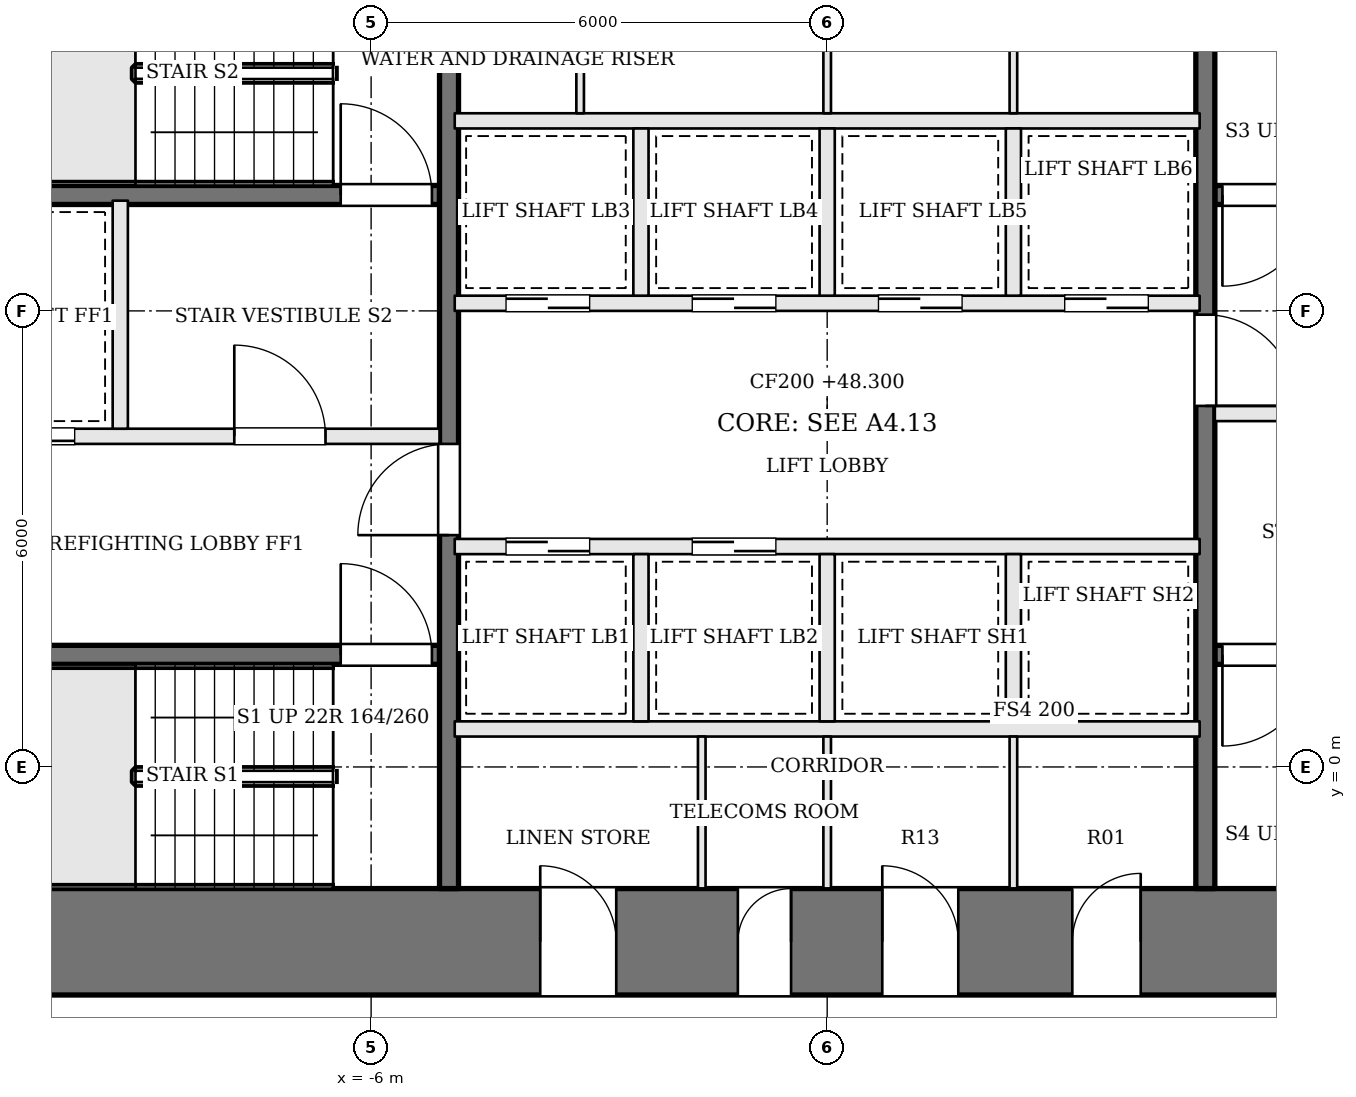
"""IFC4 building model, lengths in metres.
Left out: names, types, materials, properties, quantities, classifications, styles, units other than length and angle.
Written with IfcOpenShell. Run it as: python <this file> out.ifc"""

import sys

from ifc_helpers import new_model, si_unit, direction, frame, frame_2d, origin, place, context, subcontext, project, spatial, rectangle, extrude, element, fill, save


model = new_model("IFC4")
c1 = context("Model", 3, precision=1e-05, world=origin(), true_north=direction((0.0, 1.0)))
c2 = subcontext(c1, "Body", "Model", "MODEL_VIEW")
j1 = project(units=[si_unit("LENGTHUNIT", "METRE"), si_unit("PLANEANGLEUNIT", "RADIAN")], contexts=[c1])
p1 = place(None, origin())
s1 = spatial("IfcSite", under=j1, at=p1, CompositionType="ELEMENT")
p2 = place(p1, origin())
s2 = spatial("IfcBuilding", under=s1, at=p2, CompositionType="ELEMENT")
p3 = place(p2, frame((0.0, 0.0, 48.3)))
s3 = spatial("IfcBuildingStorey", under=s2, at=p3, CompositionType="ELEMENT", Elevation=48.3)
p4 = place(p3, frame((-13.0, -2.3, 0.0), z_axis=(0.0, 0.0, 1.0), x_axis=(1.0, 0.0, 0.0)))
e1 = element("IfcWall", 1, at=p4, inside=s3, PredefinedType="SHEAR", context=c2, shape_type="SweptSolid", body=[
    extrude(rectangle(XDim=26.0, YDim=1.4, at=frame_2d((13.0, 0.0))), origin(), (0.0, 0.0, 1.0), 3.6),
])
p5 = place(p4, frame((9.225, 0.0, 0.0)))
e2 = element("IfcOpeningElement", 2, at=p5, cuts=e1, PredefinedType="OPENING", context=c2, shape_type="SweptSolid", body=[
    extrude(rectangle(XDim=1.0, YDim=2.1, at=frame_2d((0.5, 1.05))), frame((0.0, 0.71, 0.0), z_axis=(0.0, -1.0, 0.0), x_axis=(1.0, 0.0, 0.0)), (0.0, 0.0, 1.0), 1.42),
])
p6 = place(p4, frame((11.825, 0.0, 0.0)))
e3 = element("IfcOpeningElement", 3, at=p6, cuts=e1, PredefinedType="OPENING", context=c2, shape_type="SweptSolid", body=[
    extrude(rectangle(XDim=0.7, YDim=2.1, at=frame_2d((0.35, 1.05))), frame((0.0, 0.71, 0.0), z_axis=(0.0, -1.0, 0.0), x_axis=(1.0, 0.0, 0.0)), (0.0, 0.0, 1.0), 1.42),
])
p7 = place(p4, frame((13.725, 0.0, 0.0)))
e4 = element("IfcOpeningElement", 4, at=p7, cuts=e1, PredefinedType="OPENING", context=c2, shape_type="SweptSolid", body=[
    extrude(rectangle(XDim=1.0, YDim=2.1, at=frame_2d((0.5, 1.05))), frame((0.0, 0.71, 0.0), z_axis=(0.0, -1.0, 0.0), x_axis=(1.0, 0.0, 0.0)), (0.0, 0.0, 1.0), 1.42),
])
p8 = place(p4, frame((16.225, 0.0, 0.0)))
e5 = element("IfcOpeningElement", 5, at=p8, cuts=e1, PredefinedType="OPENING", context=c2, shape_type="SweptSolid", body=[
    extrude(rectangle(XDim=0.9, YDim=2.1, at=frame_2d((0.45, 1.05))), frame((0.0, 0.71, 0.0), z_axis=(0.0, -1.0, 0.0), x_axis=(1.0, 0.0, 0.0)), (0.0, 0.0, 1.0), 1.42),
])
p9 = place(p3, frame((-11.6, 1.475, 0.0), z_axis=(0.0, 0.0, 1.0), x_axis=(1.0, 0.0, 0.0)))
e6 = element("IfcWall", 6, at=p9, inside=s3, PredefinedType="SOLIDWALL", context=c2, shape_type="SweptSolid", body=[
    extrude(rectangle(XDim=6.5, YDim=0.25, at=frame_2d((3.25, 0.0))), origin(), (0.0, 0.0, 1.0), 3.4),
])
p10 = place(p9, frame((5.2, 0.0, 0.0)))
e7 = element("IfcOpeningElement", 7, at=p10, cuts=e6, PredefinedType="OPENING", context=c2, shape_type="SweptSolid", body=[
    extrude(rectangle(XDim=1.2, YDim=2.1, at=frame_2d((0.6, 1.05))), frame((0.0, 0.135, 0.0), z_axis=(0.0, -1.0, 0.0), x_axis=(1.0, 0.0, 0.0)), (0.0, 0.0, 1.0), 0.27),
])
p11 = place(p3, frame((11.6, 7.525, 0.0), z_axis=(0.0, 0.0, 1.0), x_axis=(-1.0, 0.0, 0.0)))
e8 = element("IfcWall", 8, at=p11, inside=s3, PredefinedType="SOLIDWALL", context=c2, shape_type="SweptSolid", body=[
    extrude(rectangle(XDim=6.5, YDim=0.25, at=frame_2d((3.25, 0.0))), origin(), (0.0, 0.0, 1.0), 3.4),
])
p12 = place(p11, frame((5.2, 0.0, 0.0)))
e9 = element("IfcOpeningElement", 9, at=p12, cuts=e8, PredefinedType="OPENING", context=c2, shape_type="SweptSolid", body=[
    extrude(rectangle(XDim=1.2, YDim=2.1, at=frame_2d((0.6, 1.05))), frame((0.0, 0.135, 0.0), z_axis=(0.0, -1.0, 0.0), x_axis=(1.0, 0.0, 0.0)), (0.0, 0.0, 1.0), 0.27),
])
p13 = place(p3, frame((-11.6, 4.35, 0.0), z_axis=(0.0, 0.0, 1.0), x_axis=(1.0, 0.0, 0.0)))
e10 = element("IfcWall", 10, at=p13, inside=s3, PredefinedType="SOLIDWALL", context=c2, shape_type="SweptSolid", body=[
    extrude(rectangle(XDim=6.5, YDim=0.2, at=frame_2d((3.25, 0.0))), origin(), (0.0, 0.0, 1.0), 3.4),
])
p14 = place(p13, frame((3.8, 0.0, 0.0)))
e11 = element("IfcOpeningElement", 11, at=p14, cuts=e10, PredefinedType="OPENING", context=c2, shape_type="SweptSolid", body=[
    extrude(rectangle(XDim=1.2, YDim=2.1, at=frame_2d((0.6, 1.05))), frame((0.0, 0.11, 0.0), z_axis=(0.0, -1.0, 0.0), x_axis=(1.0, 0.0, 0.0)), (0.0, 0.0, 1.0), 0.22),
])
p15 = place(p13, frame((0.5, 0.0, 0.0)))
e12 = element("IfcOpeningElement", 12, at=p15, cuts=e10, PredefinedType="OPENING", context=c2, shape_type="SweptSolid", body=[
    extrude(rectangle(XDim=1.2, YDim=2.1, at=frame_2d((0.6, 1.05))), frame((0.0, 0.11, 0.0), z_axis=(0.0, -1.0, 0.0), x_axis=(1.0, 0.0, 0.0)), (0.0, 0.0, 1.0), 0.22),
])
p16 = place(p3, frame((11.6, 4.65, 0.0), z_axis=(0.0, 0.0, 1.0), x_axis=(-1.0, 0.0, 0.0)))
e13 = element("IfcWall", 13, at=p16, inside=s3, PredefinedType="SOLIDWALL", context=c2, shape_type="SweptSolid", body=[
    extrude(rectangle(XDim=6.5, YDim=0.2, at=frame_2d((3.25, 0.0))), origin(), (0.0, 0.0, 1.0), 3.4),
])
p17 = place(p16, frame((3.8, 0.0, 0.0)))
e14 = element("IfcOpeningElement", 14, at=p17, cuts=e13, PredefinedType="OPENING", context=c2, shape_type="SweptSolid", body=[
    extrude(rectangle(XDim=1.2, YDim=2.1, at=frame_2d((0.6, 1.05))), frame((0.0, 0.11, 0.0), z_axis=(0.0, -1.0, 0.0), x_axis=(1.0, 0.0, 0.0)), (0.0, 0.0, 1.0), 0.22),
])
p18 = place(p16, frame((0.5, 0.0, 0.0)))
e15 = element("IfcOpeningElement", 15, at=p18, cuts=e13, PredefinedType="OPENING", context=c2, shape_type="SweptSolid", body=[
    extrude(rectangle(XDim=1.2, YDim=2.1, at=frame_2d((0.6, 1.05))), frame((0.0, 0.11, 0.0), z_axis=(0.0, -1.0, 0.0), x_axis=(1.0, 0.0, 0.0)), (0.0, 0.0, 1.0), 0.22),
])
p19 = place(p3, frame((-11.6, 7.525, 0.0), z_axis=(0.0, 0.0, 1.0), x_axis=(1.0, 0.0, 0.0)))
e16 = element("IfcWall", 16, at=p19, inside=s3, PredefinedType="SOLIDWALL", context=c2, shape_type="SweptSolid", body=[
    extrude(rectangle(XDim=6.5, YDim=0.25, at=frame_2d((3.25, 0.0))), origin(), (0.0, 0.0, 1.0), 3.4),
])
p20 = place(p19, frame((5.2, 0.0, 0.0)))
e17 = element("IfcOpeningElement", 17, at=p20, cuts=e16, PredefinedType="OPENING", context=c2, shape_type="SweptSolid", body=[
    extrude(rectangle(XDim=1.2, YDim=2.1, at=frame_2d((0.6, 1.05))), frame((0.0, 0.135, 0.0), z_axis=(0.0, -1.0, 0.0), x_axis=(1.0, 0.0, 0.0)), (0.0, 0.0, 1.0), 0.27),
])
p21 = place(p3, frame((11.6, 1.475, 0.0), z_axis=(0.0, 0.0, 1.0), x_axis=(-1.0, 0.0, 0.0)))
e18 = element("IfcWall", 18, at=p21, inside=s3, PredefinedType="SOLIDWALL", context=c2, shape_type="SweptSolid", body=[
    extrude(rectangle(XDim=6.5, YDim=0.25, at=frame_2d((3.25, 0.0))), origin(), (0.0, 0.0, 1.0), 3.4),
])
p22 = place(p21, frame((5.2, 0.0, 0.0)))
e19 = element("IfcOpeningElement", 19, at=p22, cuts=e18, PredefinedType="OPENING", context=c2, shape_type="SweptSolid", body=[
    extrude(rectangle(XDim=1.2, YDim=2.1, at=frame_2d((0.6, 1.05))), frame((0.0, 0.135, 0.0), z_axis=(0.0, -1.0, 0.0), x_axis=(1.0, 0.0, 0.0)), (0.0, 0.0, 1.0), 0.27),
])
p23 = place(p3, frame((-9.3, 4.45, 0.0), z_axis=(0.0, 0.0, 1.0), x_axis=(0.0, 1.0, 0.0)))
e20 = element("IfcWall", 20, at=p23, inside=s3, PredefinedType="SOLIDWALL", context=c2, shape_type="SweptSolid", body=[
    extrude(rectangle(XDim=3.0, YDim=0.2, at=frame_2d((1.5, 0.0))), origin(), (0.0, 0.0, 1.0), 3.4),
])
p24 = place(p3, frame((-4.975, -1.6, 0.0), z_axis=(0.0, 0.0, 1.0), x_axis=(0.0, 1.0, 0.0)))
e21 = element("IfcWall", 21, at=p24, inside=s3, PredefinedType="SOLIDWALL", context=c2, shape_type="SweptSolid", body=[
    extrude(rectangle(XDim=12.2, YDim=0.25, at=frame_2d((6.1, 0.0))), origin(), (0.0, 0.0, 1.0), 3.4),
])
p25 = place(p24, frame((4.65, 0.0, 0.0)))
e22 = element("IfcOpeningElement", 22, at=p25, cuts=e21, PredefinedType="OPENING", context=c2, shape_type="SweptSolid", body=[
    extrude(rectangle(XDim=1.2, YDim=2.1, at=frame_2d((0.6, 1.05))), frame((0.0, 0.135, 0.0), z_axis=(0.0, -1.0, 0.0), x_axis=(1.0, 0.0, 0.0)), (0.0, 0.0, 1.0), 0.27),
])
p26 = place(p3, frame((4.975, 10.6, 0.0), z_axis=(0.0, 0.0, 1.0), x_axis=(0.0, -1.0, 0.0)))
e23 = element("IfcWall", 23, at=p26, inside=s3, PredefinedType="SOLIDWALL", context=c2, shape_type="SweptSolid", body=[
    extrude(rectangle(XDim=12.2, YDim=0.25, at=frame_2d((6.1, 0.0))), origin(), (0.0, 0.0, 1.0), 3.4),
])
p27 = place(p26, frame((4.65, 0.0, 0.0)))
e24 = element("IfcOpeningElement", 24, at=p27, cuts=e23, PredefinedType="OPENING", context=c2, shape_type="SweptSolid", body=[
    extrude(rectangle(XDim=1.2, YDim=2.1, at=frame_2d((0.6, 1.05))), frame((0.0, 0.135, 0.0), z_axis=(0.0, -1.0, 0.0), x_axis=(1.0, 0.0, 0.0)), (0.0, 0.0, 1.0), 0.27),
])
p28 = place(p3, frame((-4.9, 0.5, 0.0), z_axis=(0.0, 0.0, 1.0), x_axis=(1.0, 0.0, 0.0)))
e25 = element("IfcWall", 25, at=p28, inside=s3, PredefinedType="SOLIDWALL", context=c2, shape_type="SweptSolid", body=[
    extrude(rectangle(XDim=9.8, YDim=0.2, at=frame_2d((4.9, 0.0))), origin(), (0.0, 0.0, 1.0), 3.4),
])
p29 = place(p3, frame((-4.9, 2.9, 0.0), z_axis=(0.0, 0.0, 1.0), x_axis=(1.0, 0.0, 0.0)))
e26 = element("IfcWall", 26, at=p29, inside=s3, PredefinedType="SOLIDWALL", context=c2, shape_type="SweptSolid", body=[
    extrude(rectangle(XDim=9.8, YDim=0.2, at=frame_2d((4.9, 0.0))), origin(), (0.0, 0.0, 1.0), 3.4),
])
p30 = place(p29, frame((0.675, 0.0, 0.0)))
e27 = element("IfcOpeningElement", 27, at=p30, cuts=e26, PredefinedType="OPENING", context=c2, shape_type="SweptSolid", body=[
    extrude(rectangle(XDim=1.1, YDim=2.1, at=frame_2d((0.55, 1.05))), frame((0.0, 0.11, 0.0), z_axis=(0.0, -1.0, 0.0), x_axis=(1.0, 0.0, 0.0)), (0.0, 0.0, 1.0), 0.22),
])
p31 = place(p29, frame((3.125, 0.0, 0.0)))
e28 = element("IfcOpeningElement", 28, at=p31, cuts=e26, PredefinedType="OPENING", context=c2, shape_type="SweptSolid", body=[
    extrude(rectangle(XDim=1.1, YDim=2.1, at=frame_2d((0.55, 1.05))), frame((0.0, 0.11, 0.0), z_axis=(0.0, -1.0, 0.0), x_axis=(1.0, 0.0, 0.0)), (0.0, 0.0, 1.0), 0.22),
])
p32 = place(p3, frame((-4.9, 6.1, 0.0), z_axis=(0.0, 0.0, 1.0), x_axis=(1.0, 0.0, 0.0)))
e29 = element("IfcWall", 29, at=p32, inside=s3, PredefinedType="SOLIDWALL", context=c2, shape_type="SweptSolid", body=[
    extrude(rectangle(XDim=9.8, YDim=0.2, at=frame_2d((4.9, 0.0))), origin(), (0.0, 0.0, 1.0), 3.4),
])
p33 = place(p32, frame((0.675, 0.0, 0.0)))
e30 = element("IfcOpeningElement", 30, at=p33, cuts=e29, PredefinedType="OPENING", context=c2, shape_type="SweptSolid", body=[
    extrude(rectangle(XDim=1.1, YDim=2.1, at=frame_2d((0.55, 1.05))), frame((0.0, 0.11, 0.0), z_axis=(0.0, -1.0, 0.0), x_axis=(1.0, 0.0, 0.0)), (0.0, 0.0, 1.0), 0.22),
])
p34 = place(p32, frame((3.125, 0.0, 0.0)))
e31 = element("IfcOpeningElement", 31, at=p34, cuts=e29, PredefinedType="OPENING", context=c2, shape_type="SweptSolid", body=[
    extrude(rectangle(XDim=1.1, YDim=2.1, at=frame_2d((0.55, 1.05))), frame((0.0, 0.11, 0.0), z_axis=(0.0, -1.0, 0.0), x_axis=(1.0, 0.0, 0.0)), (0.0, 0.0, 1.0), 0.22),
])
p35 = place(p32, frame((5.575, 0.0, 0.0)))
e32 = element("IfcOpeningElement", 32, at=p35, cuts=e29, PredefinedType="OPENING", context=c2, shape_type="SweptSolid", body=[
    extrude(rectangle(XDim=1.1, YDim=2.1, at=frame_2d((0.55, 1.05))), frame((0.0, 0.11, 0.0), z_axis=(0.0, -1.0, 0.0), x_axis=(1.0, 0.0, 0.0)), (0.0, 0.0, 1.0), 0.22),
])
p36 = place(p32, frame((8.025, 0.0, 0.0)))
e33 = element("IfcOpeningElement", 33, at=p36, cuts=e29, PredefinedType="OPENING", context=c2, shape_type="SweptSolid", body=[
    extrude(rectangle(XDim=1.1, YDim=2.1, at=frame_2d((0.55, 1.05))), frame((0.0, 0.11, 0.0), z_axis=(0.0, -1.0, 0.0), x_axis=(1.0, 0.0, 0.0)), (0.0, 0.0, 1.0), 0.22),
])
p37 = place(p3, frame((-4.9, 8.5, 0.0), z_axis=(0.0, 0.0, 1.0), x_axis=(1.0, 0.0, 0.0)))
e34 = element("IfcWall", 34, at=p37, inside=s3, PredefinedType="SOLIDWALL", context=c2, shape_type="SweptSolid", body=[
    extrude(rectangle(XDim=9.8, YDim=0.2, at=frame_2d((4.9, 0.0))), origin(), (0.0, 0.0, 1.0), 3.4),
])
for number, where, z_axis, x_axis in (
    (35, (-2.45, 0.6, 0.0), (0.0, 0.0, 1.0), (0.0, 1.0, 0.0)),
    (36, (0.0, 0.6, 0.0), (0.0, 0.0, 1.0), (0.0, 1.0, 0.0)),
    (37, (2.45, 0.6, 0.0), (0.0, 0.0, 1.0), (0.0, 1.0, 0.0)),
    (38, (-2.45, 6.2, 0.0), (0.0, 0.0, 1.0), (0.0, 1.0, 0.0)),
    (39, (0.0, 6.2, 0.0), (0.0, 0.0, 1.0), (0.0, 1.0, 0.0)),
    (40, (2.45, 6.2, 0.0), (0.0, 0.0, 1.0), (0.0, 1.0, 0.0)),
):
    element("IfcWall", number, at=place(p3, frame(where, z_axis=z_axis, x_axis=x_axis)), inside=s3, PredefinedType="SOLIDWALL", context=c2, shape_type="SweptSolid", body=[
        extrude(rectangle(XDim=2.2, YDim=0.2, at=frame_2d((1.1, 0.0))), origin(), (0.0, 0.0, 1.0), 3.4),
    ])
for number, where, z_axis, x_axis in (
    (41, (-1.65, -1.6, 0.0), (0.0, 0.0, 1.0), (0.0, 1.0, 0.0)),
    (42, (0.0, -1.6, 0.0), (0.0, 0.0, 1.0), (0.0, 1.0, 0.0)),
    (43, (2.45, -1.6, 0.0), (0.0, 0.0, 1.0), (0.0, 1.0, 0.0)),
    (44, (-3.25, 8.6, 0.0), (0.0, 0.0, 1.0), (0.0, 1.0, 0.0)),
    (45, (0.0, 8.6, 0.0), (0.0, 0.0, 1.0), (0.0, 1.0, 0.0)),
    (46, (2.45, 8.6, 0.0), (0.0, 0.0, 1.0), (0.0, 1.0, 0.0)),
):
    element("IfcWall", number, at=place(p3, frame(where, z_axis=z_axis, x_axis=x_axis)), inside=s3, PredefinedType="PARTITIONING", context=c2, shape_type="SweptSolid", body=[
        extrude(rectangle(XDim=2.0, YDim=0.1, at=frame_2d((1.0, 0.0))), origin(), (0.0, 0.0, 1.0), 3.4),
    ])
p38 = place(p25, origin())
e47 = element("IfcDoor", 47, at=p38, inside=s3, OperationType="SINGLE_SWING_LEFT", PredefinedType="DOOR", context=c2, shape_type="SweptSolid", body=[
    extrude(rectangle(XDim=1.2, YDim=2.1, at=frame_2d((0.6, 1.05))), frame((0.0, 0.025, 0.0), z_axis=(0.0, -1.0, 0.0), x_axis=(1.0, 0.0, 0.0)), (0.0, 0.0, 1.0), 0.05),
])
fill(e22, e47)
p39 = place(p27, origin())
e48 = element("IfcDoor", 48, at=p39, inside=s3, OperationType="SINGLE_SWING_RIGHT", PredefinedType="DOOR", context=c2, shape_type="SweptSolid", body=[
    extrude(rectangle(XDim=1.2, YDim=2.1, at=frame_2d((0.6, 1.05))), frame((0.0, 0.025, 0.0), z_axis=(0.0, -1.0, 0.0), x_axis=(1.0, 0.0, 0.0)), (0.0, 0.0, 1.0), 0.05),
])
fill(e24, e48)
p40 = place(p14, origin())
e49 = element("IfcDoor", 49, at=p40, inside=s3, OperationType="SINGLE_SWING_LEFT", PredefinedType="DOOR", context=c2, shape_type="SweptSolid", body=[
    extrude(rectangle(XDim=1.2, YDim=2.1, at=frame_2d((0.6, 1.05))), frame((0.0, 0.025, 0.0), z_axis=(0.0, -1.0, 0.0), x_axis=(1.0, 0.0, 0.0)), (0.0, 0.0, 1.0), 0.05),
])
fill(e11, e49)
p41 = place(p10, origin())
e50 = element("IfcDoor", 50, at=p41, inside=s3, OperationType="SINGLE_SWING_LEFT", PredefinedType="DOOR", context=c2, shape_type="SweptSolid", body=[
    extrude(rectangle(XDim=1.2, YDim=2.1, at=frame_2d((0.6, 1.05))), frame((0.0, 0.025, 0.0), z_axis=(0.0, -1.0, 0.0), x_axis=(1.0, 0.0, 0.0)), (0.0, 0.0, 1.0), 0.05),
])
fill(e7, e50)
p42 = place(p12, origin())
e51 = element("IfcDoor", 51, at=p42, inside=s3, OperationType="SINGLE_SWING_RIGHT", PredefinedType="DOOR", context=c2, shape_type="SweptSolid", body=[
    extrude(rectangle(XDim=1.2, YDim=2.1, at=frame_2d((0.6, 1.05))), frame((0.0, 0.025, 0.0), z_axis=(0.0, -1.0, 0.0), x_axis=(1.0, 0.0, 0.0)), (0.0, 0.0, 1.0), 0.05),
])
fill(e9, e51)
p43 = place(p20, origin())
e52 = element("IfcDoor", 52, at=p43, inside=s3, OperationType="SINGLE_SWING_LEFT", PredefinedType="DOOR", context=c2, shape_type="SweptSolid", body=[
    extrude(rectangle(XDim=1.2, YDim=2.1, at=frame_2d((0.6, 1.05))), frame((0.0, 0.025, 0.0), z_axis=(0.0, -1.0, 0.0), x_axis=(1.0, 0.0, 0.0)), (0.0, 0.0, 1.0), 0.05),
])
fill(e17, e52)
p44 = place(p22, origin())
e53 = element("IfcDoor", 53, at=p44, inside=s3, OperationType="SINGLE_SWING_RIGHT", PredefinedType="DOOR", context=c2, shape_type="SweptSolid", body=[
    extrude(rectangle(XDim=1.2, YDim=2.1, at=frame_2d((0.6, 1.05))), frame((0.0, 0.025, 0.0), z_axis=(0.0, -1.0, 0.0), x_axis=(1.0, 0.0, 0.0)), (0.0, 0.0, 1.0), 0.05),
])
fill(e19, e53)
p45 = place(p15, origin())
e54 = element("IfcDoor", 54, at=p45, inside=s3, OperationType="SLIDING_TO_RIGHT", PredefinedType="DOOR", context=c2, shape_type="SweptSolid", body=[
    extrude(rectangle(XDim=1.2, YDim=2.1, at=frame_2d((0.6, 1.05))), frame((0.0, 0.025, 0.0), z_axis=(0.0, -1.0, 0.0), x_axis=(1.0, 0.0, 0.0)), (0.0, 0.0, 1.0), 0.05),
])
fill(e12, e54)
p46 = place(p30, origin())
e55 = element("IfcDoor", 55, at=p46, inside=s3, OperationType="SLIDING_TO_RIGHT", PredefinedType="DOOR", context=c2, shape_type="SweptSolid", body=[
    extrude(rectangle(XDim=1.1, YDim=2.1, at=frame_2d((0.55, 1.05))), frame((0.0, 0.025, 0.0), z_axis=(0.0, -1.0, 0.0), x_axis=(1.0, 0.0, 0.0)), (0.0, 0.0, 1.0), 0.05),
])
fill(e27, e55)
p47 = place(p31, origin())
e56 = element("IfcDoor", 56, at=p47, inside=s3, OperationType="SLIDING_TO_LEFT", PredefinedType="DOOR", context=c2, shape_type="SweptSolid", body=[
    extrude(rectangle(XDim=1.1, YDim=2.1, at=frame_2d((0.55, 1.05))), frame((0.0, 0.025, 0.0), z_axis=(0.0, -1.0, 0.0), x_axis=(1.0, 0.0, 0.0)), (0.0, 0.0, 1.0), 0.05),
])
fill(e28, e56)
p48 = place(p33, origin())
e57 = element("IfcDoor", 57, at=p48, inside=s3, OperationType="SLIDING_TO_RIGHT", PredefinedType="DOOR", context=c2, shape_type="SweptSolid", body=[
    extrude(rectangle(XDim=1.1, YDim=2.1, at=frame_2d((0.55, 1.05))), frame((0.0, 0.025, 0.0), z_axis=(0.0, -1.0, 0.0), x_axis=(1.0, 0.0, 0.0)), (0.0, 0.0, 1.0), 0.05),
])
fill(e30, e57)
p49 = place(p34, origin())
e58 = element("IfcDoor", 58, at=p49, inside=s3, OperationType="SLIDING_TO_LEFT", PredefinedType="DOOR", context=c2, shape_type="SweptSolid", body=[
    extrude(rectangle(XDim=1.1, YDim=2.1, at=frame_2d((0.55, 1.05))), frame((0.0, 0.025, 0.0), z_axis=(0.0, -1.0, 0.0), x_axis=(1.0, 0.0, 0.0)), (0.0, 0.0, 1.0), 0.05),
])
fill(e31, e58)
p50 = place(p35, origin())
e59 = element("IfcDoor", 59, at=p50, inside=s3, OperationType="SLIDING_TO_RIGHT", PredefinedType="DOOR", context=c2, shape_type="SweptSolid", body=[
    extrude(rectangle(XDim=1.1, YDim=2.1, at=frame_2d((0.55, 1.05))), frame((0.0, 0.025, 0.0), z_axis=(0.0, -1.0, 0.0), x_axis=(1.0, 0.0, 0.0)), (0.0, 0.0, 1.0), 0.05),
])
fill(e32, e59)
p51 = place(p36, origin())
e60 = element("IfcDoor", 60, at=p51, inside=s3, OperationType="SLIDING_TO_LEFT", PredefinedType="DOOR", context=c2, shape_type="SweptSolid", body=[
    extrude(rectangle(XDim=1.1, YDim=2.1, at=frame_2d((0.55, 1.05))), frame((0.0, 0.025, 0.0), z_axis=(0.0, -1.0, 0.0), x_axis=(1.0, 0.0, 0.0)), (0.0, 0.0, 1.0), 0.05),
])
fill(e33, e60)
p52 = place(p5, origin())
e61 = element("IfcDoor", 61, at=p52, inside=s3, OperationType="SINGLE_SWING_LEFT", PredefinedType="DOOR", context=c2, shape_type="SweptSolid", body=[
    extrude(rectangle(XDim=1.0, YDim=2.1, at=frame_2d((0.5, 1.05))), frame((0.0, 0.025, 0.0), z_axis=(0.0, -1.0, 0.0), x_axis=(1.0, 0.0, 0.0)), (0.0, 0.0, 1.0), 0.05),
])
fill(e2, e61)
p53 = place(p6, origin())
e62 = element("IfcDoor", 62, at=p53, inside=s3, OperationType="SINGLE_SWING_RIGHT", PredefinedType="DOOR", context=c2, shape_type="SweptSolid", body=[
    extrude(rectangle(XDim=0.7, YDim=2.1, at=frame_2d((0.35, 1.05))), frame((0.0, 0.025, 0.0), z_axis=(0.0, -1.0, 0.0), x_axis=(1.0, 0.0, 0.0)), (0.0, 0.0, 1.0), 0.05),
])
fill(e3, e62)
p54 = place(p7, origin())
e63 = element("IfcDoor", 63, at=p54, inside=s3, OperationType="SINGLE_SWING_LEFT", PredefinedType="DOOR", context=c2, shape_type="SweptSolid", body=[
    extrude(rectangle(XDim=1.0, YDim=2.1, at=frame_2d((0.5, 1.05))), frame((0.0, 0.025, 0.0), z_axis=(0.0, -1.0, 0.0), x_axis=(1.0, 0.0, 0.0)), (0.0, 0.0, 1.0), 0.05),
])
fill(e4, e63)
p55 = place(p8, origin())
e64 = element("IfcDoor", 64, at=p55, inside=s3, OperationType="SINGLE_SWING_RIGHT", PredefinedType="DOOR", context=c2, shape_type="SweptSolid", body=[
    extrude(rectangle(XDim=0.9, YDim=2.1, at=frame_2d((0.45, 1.05))), frame((0.0, 0.025, 0.0), z_axis=(0.0, -1.0, 0.0), x_axis=(1.0, 0.0, 0.0)), (0.0, 0.0, 1.0), 0.05),
])
fill(e5, e64)
save(model, sys.argv[1])
